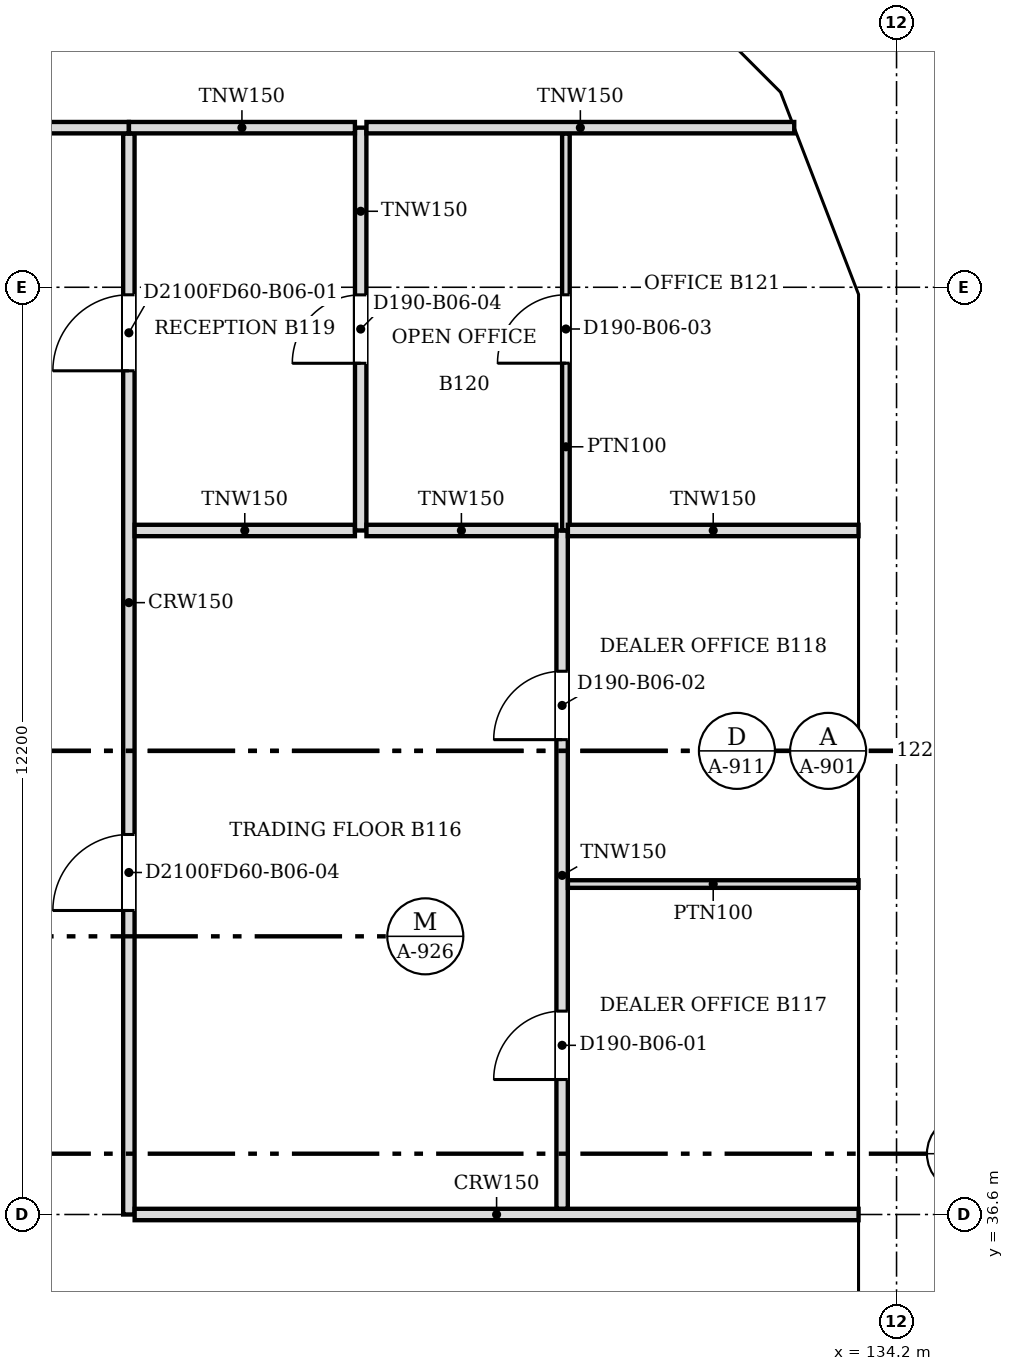
"""IFC4 building model, lengths in metres.
Left out: names, types, materials, properties, quantities, classifications, styles, units other than length and angle.
Written with IfcOpenShell. Run it as: python <this file> out.ifc"""

import sys

from ifc_helpers import new_model, si_unit, direction, frame, frame_2d, origin, place, context, subcontext, project, spatial, polyline, rectangle, outline, extrude, faceted_brep, source, transform, mapped, element, fill, save


model = new_model("IFC4")
c1 = context("Model", 3, precision=1e-05, world=origin(), true_north=direction((0.0, 1.0)))
c2 = subcontext(c1, "Body", "Model", "MODEL_VIEW")
j1 = project(units=[si_unit("LENGTHUNIT", "METRE"), si_unit("PLANEANGLEUNIT", "RADIAN")], contexts=[c1])
p1 = place(None, origin())
s1 = spatial("IfcSite", under=j1, at=p1, CompositionType="ELEMENT")
p2 = place(p1, origin())
s2 = spatial("IfcBuilding", under=s1, at=p2, CompositionType="ELEMENT")
p3 = place(p2, frame((0.0, 0.0, 60.0)))
s3 = spatial("IfcBuildingStorey", under=s2, at=p3, CompositionType="ELEMENT", Elevation=60.0)
m1 = source(origin(), c2, "Body", "Brep", [
    faceted_brep([(3.05, -0.25, 0.0), (6.1, -0.25, 3.8), (6.1, -0.25, 3.8), (3.05, -0.25, 7.6), (0.0, -0.25, 3.8), (0.0, 0.25, 3.8), (3.05, 0.25, 7.6), (6.1, 0.25, 3.8), (6.1, 0.25, 3.8), (3.05, 0.25, 0.0)], [[[0, 1, 2, 3, 4]], [[5, 6, 7, 8, 9]], [[9, 8, 1, 0]], [[7, 6, 3, 2]], [[6, 5, 4, 3]], [[5, 9, 0, 4]], [[1, 8, 7, 2]]]),
])
p4 = place(p3, frame((133.95, 33.55, -3.8), z_axis=(0.0, 0.0, 1.0), x_axis=(0.0, 1.0, 0.0)))
e1 = element("IfcWall", 1, at=p4, inside=s3, PredefinedType="SOLIDWALL", context=c2, shape_type="MappedRepresentation", body=[
    mapped(m1, transform((0.0, 0.0, 0.0), scale=1.0)),
])
m2 = source(origin(), c2, "Body", "SweptSolid", [
    extrude(outline(polyline([(3.05, 0.399), (5.78, 3.8), (3.05, 7.201), (0.321, 3.8), (3.05, 0.399)])), frame((0.0, 0.26, 0.0), z_axis=(0.0, -1.0, 0.0), x_axis=(1.0, 0.0, 0.0)), (0.0, 0.0, 1.0), 0.52),
])
p5 = place(p4, origin())
e2 = element("IfcOpeningElement", 2, at=p5, cuts=e1, PredefinedType="OPENING", context=c2, shape_type="MappedRepresentation", body=[
    mapped(m2, transform((0.0, 0.0, 0.0), scale=1.0)),
])
m3 = source(origin(), c2, "Body", "SweptSolid", [
    extrude(outline(polyline([(3.05, 0.0), (6.1, 3.8), (3.05, 7.6), (0.0, 3.8), (3.05, 0.0)])), frame((0.0, 0.25, 0.0), z_axis=(0.0, -1.0, 0.0), x_axis=(1.0, 0.0, 0.0)), (0.0, 0.0, 1.0), 0.5),
])
p6 = place(p3, frame((133.95, 39.65, -3.8), z_axis=(0.0, 0.0, 1.0), x_axis=(0.0, 1.0, 0.0)))
e3 = element("IfcWall", 3, at=p6, inside=s3, PredefinedType="SOLIDWALL", context=c2, shape_type="MappedRepresentation", body=[
    mapped(m3, transform((0.0, 0.0, 0.0), scale=1.0)),
])
p7 = place(p6, origin())
e4 = element("IfcOpeningElement", 4, at=p7, cuts=e3, PredefinedType="OPENING", context=c2, shape_type="MappedRepresentation", body=[
    mapped(m2, transform((0.0, 0.0, 0.0), scale=1.0)),
])
m4 = source(origin(), c2, "Body", "Brep", [
    faceted_brep([(3.003, -0.25, 0.0), (3.05, -0.25, 0.06), (3.05, -0.25, 7.54), (3.003, -0.25, 7.6), (0.0, -0.25, 3.8), (0.0, 0.25, 3.8), (2.957, 0.25, 7.541), (2.957, 0.25, 0.059), (3.003, 0.0, 0.0), (3.003, 0.0, 7.6)], [[[0, 1, 2, 3, 4]], [[5, 6, 7]], [[1, 0, 8]], [[9, 3, 2]], [[6, 5, 4, 3, 9]], [[5, 7, 8, 0, 4]], [[1, 8, 7, 6, 9, 2]]]),
])
p8 = place(p3, frame((133.95, 45.75, -3.8), z_axis=(0.0, 0.0, 1.0), x_axis=(0.0, 1.0, 0.0)))
e5 = element("IfcWall", 5, at=p8, inside=s3, PredefinedType="SOLIDWALL", context=c2, shape_type="MappedRepresentation", body=[
    mapped(m4, transform((0.0, 0.0, 0.0), scale=1.0)),
])
m5 = source(origin(), c2, "Body", "SweptSolid", [
    extrude(outline(polyline([(2.803, 6.944), (0.319, 3.8), (2.803, 0.656), (2.803, 6.944)])), frame((0.0, 0.26, 0.0), z_axis=(0.0, -1.0, 0.0), x_axis=(1.0, 0.0, 0.0)), (0.0, 0.0, 1.0), 0.52),
])
p9 = place(p8, origin())
e6 = element("IfcOpeningElement", 6, at=p9, cuts=e5, PredefinedType="OPENING", context=c2, shape_type="MappedRepresentation", body=[
    mapped(m5, transform((0.0, 0.0, 0.0), scale=1.0)),
])
m6 = source(origin(), c2, "Body", "Brep", [
    faceted_brep([(0.047, -0.25, 0.0), (2.997, -0.25, 3.8), (0.047, -0.25, 7.6), (0.0, -0.25, 7.541), (0.0, -0.25, 0.059), (0.093, 0.25, 7.54), (2.944, 0.25, 3.868), (2.944, 0.25, 3.732), (0.093, 0.25, 0.06), (2.997, 0.0, 3.8), (0.047, 0.0, 0.0), (0.047, 0.0, 7.6)], [[[0, 1, 2, 3, 4]], [[5, 6, 7, 8]], [[8, 7, 9, 1, 0, 10]], [[6, 5, 11, 2, 1, 9]], [[3, 2, 11]], [[10, 0, 4]], [[8, 10, 4, 3, 11, 5]], [[9, 7, 6]]]),
])
p10 = place(p3, frame((133.967, 48.71, -3.8), z_axis=(0.0, 0.0, 1.0), x_axis=(-0.359901446078, 0.932990326376, 0.0)))
e7 = element("IfcWall", 7, at=p10, inside=s3, PredefinedType="SOLIDWALL", context=c2, shape_type="MappedRepresentation", body=[
    mapped(m6, transform((0.0, 0.0, 0.0), scale=1.0)),
])
m7 = source(origin(), c2, "Body", "SweptSolid", [
    extrude(outline(polyline([(0.247, 0.665), (2.681, 3.8), (0.247, 6.935), (0.247, 0.665)])), frame((0.0, 0.26, 0.0), z_axis=(0.0, -1.0, 0.0), x_axis=(1.0, 0.0, 0.0)), (0.0, 0.0, 1.0), 0.52),
])
p11 = place(p10, origin())
e8 = element("IfcOpeningElement", 8, at=p11, cuts=e7, PredefinedType="OPENING", context=c2, shape_type="MappedRepresentation", body=[
    mapped(m7, transform((0.0, 0.0, 0.0), scale=1.0)),
])
m8 = source(origin(), c2, "Body", "Brep", [
    faceted_brep([(2.944, -0.25, 0.0), (2.997, -0.25, 0.068), (2.997, -0.25, 7.532), (2.944, -0.25, 7.6), (0.0, -0.25, 3.8), (0.053, 0.25, 3.868), (2.891, 0.25, 7.532), (2.891, 0.25, 0.068), (0.053, 0.25, 3.732), (2.944, 0.0, 0.0), (2.944, 0.0, 7.6), (0.0, 0.0, 3.8)], [[[0, 1, 2, 3, 4]], [[5, 6, 7, 8]], [[1, 0, 9]], [[10, 3, 2]], [[6, 5, 11, 4, 3, 10]], [[8, 7, 9, 0, 4, 11]], [[8, 11, 5]], [[1, 9, 7, 6, 10, 2]]]),
])
p12 = place(p3, frame((132.888, 51.506, -3.8), z_axis=(0.0, 0.0, 1.0), x_axis=(-0.707147509625, 0.707066050402, 0.0)))
e9 = element("IfcWall", 9, at=p12, inside=s3, PredefinedType="SOLIDWALL", context=c2, shape_type="MappedRepresentation", body=[
    mapped(m8, transform((0.0, 0.0, 0.0), scale=1.0)),
])
m9 = source(origin(), c2, "Body", "SweptSolid", [
    extrude(outline(polyline([(2.744, 6.934), (0.316, 3.8), (2.744, 0.666), (2.744, 6.934)])), frame((0.0, 0.26, 0.0), z_axis=(0.0, -1.0, 0.0), x_axis=(1.0, 0.0, 0.0)), (0.0, 0.0, 1.0), 0.52),
])
p13 = place(p12, origin())
e10 = element("IfcOpeningElement", 10, at=p13, cuts=e9, PredefinedType="OPENING", context=c2, shape_type="MappedRepresentation", body=[
    mapped(m9, transform((0.0, 0.0, 0.0), scale=1.0)),
])
m10 = source(origin(), c2, "Body", "SweptSolid", [
    extrude(outline(polyline([(3.05, 0.0), (6.1, 3.8), (0.0, 3.8), (3.05, 0.0)])), frame((0.0, 0.25, 0.0), z_axis=(0.0, -1.0, 0.0), x_axis=(1.0, 0.0, 0.0)), (0.0, 0.0, 1.0), 0.5),
])
p14 = place(p3, frame((133.95, 30.5, 0.0), z_axis=(0.0, 0.0, 1.0), x_axis=(0.0, 1.0, 0.0)))
e11 = element("IfcWall", 11, at=p14, inside=s3, PredefinedType="SOLIDWALL", context=c2, shape_type="MappedRepresentation", body=[
    mapped(m10, transform((0.0, 0.0, 0.0), scale=1.0)),
])
m11 = source(origin(), c2, "Body", "SweptSolid", [
    extrude(outline(polyline([(3.05, 0.399), (5.579, 3.55), (0.521, 3.55), (3.05, 0.399)])), frame((0.0, 0.26, 0.0), z_axis=(0.0, -1.0, 0.0), x_axis=(1.0, 0.0, 0.0)), (0.0, 0.0, 1.0), 0.52),
])
p15 = place(p14, origin())
e12 = element("IfcOpeningElement", 12, at=p15, cuts=e11, PredefinedType="OPENING", context=c2, shape_type="MappedRepresentation", body=[
    mapped(m11, transform((0.0, 0.0, 0.0), scale=1.0)),
])
m12 = source(origin(), c2, "Body", "Brep", [
    faceted_brep([(3.05, -0.25, 0.0), (6.1, -0.25, 3.8), (6.1, -0.25, 3.8), (0.0, -0.25, 3.8), (0.0, 0.25, 3.8), (6.1, 0.25, 3.8), (6.1, 0.25, 3.8), (3.05, 0.25, 0.0)], [[[0, 1, 2, 3]], [[4, 5, 6, 7]], [[7, 6, 1, 0]], [[5, 4, 3, 2]], [[4, 7, 0, 3]], [[1, 6, 5, 2]]]),
])
p16 = place(p3, frame((133.95, 36.6, 0.0), z_axis=(0.0, 0.0, 1.0), x_axis=(0.0, 1.0, 0.0)))
e13 = element("IfcWall", 13, at=p16, inside=s3, PredefinedType="SOLIDWALL", context=c2, shape_type="MappedRepresentation", body=[
    mapped(m12, transform((0.0, 0.0, 0.0), scale=1.0)),
])
p17 = place(p16, origin())
e14 = element("IfcOpeningElement", 14, at=p17, cuts=e13, PredefinedType="OPENING", context=c2, shape_type="MappedRepresentation", body=[
    mapped(m11, transform((0.0, 0.0, 0.0), scale=1.0)),
])
m13 = source(origin(), c2, "Body", "Brep", [
    faceted_brep([(3.05, -0.25, 0.0), (6.053, -0.25, 3.8), (0.0, -0.25, 3.8), (0.0, 0.25, 3.8), (6.007, 0.25, 3.8), (6.007, 0.25, 3.741), (3.05, 0.25, 0.0), (6.053, 0.0, 3.8)], [[[0, 1, 2]], [[3, 4, 5, 6]], [[6, 5, 7, 1, 0]], [[4, 3, 2, 1, 7]], [[3, 6, 0, 2]], [[5, 4, 7]]]),
])
p18 = place(p3, frame((133.95, 42.7, 0.0), z_axis=(0.0, 0.0, 1.0), x_axis=(0.0, 1.0, 0.0)))
e15 = element("IfcWall", 15, at=p18, inside=s3, PredefinedType="SOLIDWALL", context=c2, shape_type="MappedRepresentation", body=[
    mapped(m13, transform((0.0, 0.0, 0.0), scale=1.0)),
])
m14 = source(origin(), c2, "Body", "SweptSolid", [
    extrude(outline(polyline([(3.049, 0.401), (5.537, 3.55), (0.521, 3.55), (3.049, 0.401)])), frame((0.0, 0.26, 0.0), z_axis=(0.0, -1.0, 0.0), x_axis=(1.0, 0.0, 0.0)), (0.0, 0.0, 1.0), 0.52),
])
p19 = place(p18, origin())
e16 = element("IfcOpeningElement", 16, at=p19, cuts=e15, PredefinedType="OPENING", context=c2, shape_type="MappedRepresentation", body=[
    mapped(m14, transform((0.0, 0.0, 0.0), scale=1.0)),
])
m15 = source(origin(), c2, "Body", "Brep", [
    faceted_brep([(2.95, -0.25, 0.0), (3.003, -0.25, 0.068), (3.003, -0.25, 3.8), (0.0, -0.25, 3.8), (0.047, 0.25, 3.8), (2.898, 0.25, 3.8), (2.898, 0.25, 0.068), (0.047, 0.25, 3.74), (2.95, 0.0, 0.0), (0.0, 0.0, 3.8)], [[[0, 1, 2, 3]], [[4, 5, 6, 7]], [[1, 0, 8]], [[5, 4, 9, 3, 2]], [[7, 6, 8, 0, 3, 9]], [[7, 9, 4]], [[1, 8, 6, 5, 2]]]),
])
p20 = place(p3, frame((133.95, 48.753, 0.0), z_axis=(0.0, 0.0, 1.0), x_axis=(-0.359855894603, 0.933007896601, 0.0)))
e17 = element("IfcWall", 17, at=p20, inside=s3, PredefinedType="SOLIDWALL", context=c2, shape_type="MappedRepresentation", body=[
    mapped(m15, transform((0.0, 0.0, 0.0), scale=1.0)),
])
m16 = source(origin(), c2, "Body", "SweptSolid", [
    extrude(outline(polyline([(2.75, 3.55), (0.511, 3.55), (2.75, 0.665), (2.75, 3.55)])), frame((0.0, 0.26, 0.0), z_axis=(0.0, -1.0, 0.0), x_axis=(1.0, 0.0, 0.0)), (0.0, 0.0, 1.0), 0.52),
])
p21 = place(p20, origin())
e18 = element("IfcOpeningElement", 18, at=p21, cuts=e17, PredefinedType="OPENING", context=c2, shape_type="MappedRepresentation", body=[
    mapped(m16, transform((0.0, 0.0, 0.0), scale=1.0)),
])
m17 = source(origin(), c2, "Body", "Brep", [
    faceted_brep([(0.053, -0.25, 0.0), (2.997, -0.25, 3.8), (0.0, -0.25, 3.8), (0.0, -0.25, 0.068), (0.106, 0.25, 3.8), (2.944, 0.25, 3.8), (2.944, 0.25, 3.732), (0.106, 0.25, 0.068), (2.997, 0.0, 3.8), (0.053, 0.0, 0.0)], [[[0, 1, 2, 3]], [[4, 5, 6, 7]], [[7, 6, 8, 1, 0, 9]], [[5, 4, 2, 1, 8]], [[9, 0, 3]], [[7, 9, 3, 2, 4]], [[6, 5, 8]]]),
])
p22 = place(p3, frame((132.926, 51.469, 0.0), z_axis=(0.0, 0.0, 1.0), x_axis=(-0.707066050402, 0.707147509625, 0.0)))
e19 = element("IfcWall", 19, at=p22, inside=s3, PredefinedType="SOLIDWALL", context=c2, shape_type="MappedRepresentation", body=[
    mapped(m17, transform((0.0, 0.0, 0.0), scale=1.0)),
])
m18 = source(origin(), c2, "Body", "SweptSolid", [
    extrude(outline(polyline([(0.253, 0.666), (2.487, 3.55), (0.253, 3.55), (0.253, 0.666)])), frame((0.0, 0.26, 0.0), z_axis=(0.0, -1.0, 0.0), x_axis=(1.0, 0.0, 0.0)), (0.0, 0.0, 1.0), 0.52),
])
p23 = place(p22, origin())
e20 = element("IfcOpeningElement", 20, at=p23, cuts=e19, PredefinedType="OPENING", context=c2, shape_type="MappedRepresentation", body=[
    mapped(m18, transform((0.0, 0.0, 0.0), scale=1.0)),
])
p24 = place(p3, frame((124.1, 50.824, 0.0), z_axis=(0.0, 0.0, 1.0), x_axis=(0.0, -1.0, 0.0)))
e21 = element("IfcWall", 21, at=p24, inside=s3, PredefinedType="PARTITIONING", context=c2, shape_type="SweptSolid", body=[
    extrude(rectangle(XDim=14.224, YDim=0.15, at=frame_2d((7.112, 0.0))), origin(), (0.0, 0.0, 1.0), 2.888),
])
m19 = source(origin(), c2, "Body", "SweptSolid", [
    extrude(rectangle(XDim=1.0, YDim=2.1, at=frame_2d((0.5, 1.05))), frame((0.0, 0.085, 0.0), z_axis=(0.0, -1.0, 0.0), x_axis=(1.0, 0.0, 0.0)), (0.0, 0.0, 1.0), 0.17),
])
p25 = place(p24, frame((2.123, 0.0, 0.0)))
e22 = element("IfcOpeningElement", 22, at=p25, cuts=e21, PredefinedType="OPENING", context=c2, shape_type="MappedRepresentation", body=[
    mapped(m19, transform((0.0, 0.0, 0.0), scale=1.0)),
])
p26 = place(p24, frame((9.224, 0.0, 0.0)))
e23 = element("IfcOpeningElement", 23, at=p26, cuts=e21, PredefinedType="OPENING", context=c2, shape_type="MappedRepresentation", body=[
    mapped(m19, transform((0.0, 0.0, 0.0), scale=1.0)),
])
p27 = place(p3, frame((124.176, 36.6, 0.0), z_axis=(0.0, 0.0, 1.0), x_axis=(1.0, 0.0, 0.0)))
e24 = element("IfcWall", 24, at=p27, inside=s3, PredefinedType="PARTITIONING", context=c2, shape_type="SweptSolid", body=[
    extrude(rectangle(XDim=9.524, YDim=0.15, at=frame_2d((4.762, 0.0))), origin(), (0.0, 0.0, 1.0), 2.888),
])
p28 = place(p3, frame((129.8, 45.6, 0.0), z_axis=(0.0, 0.0, 1.0), x_axis=(0.0, -1.0, 0.0)))
e25 = element("IfcWall", 25, at=p28, inside=s3, PredefinedType="PARTITIONING", context=c2, shape_type="SweptSolid", body=[
    extrude(rectangle(XDim=8.924, YDim=0.15, at=frame_2d((4.462, 0.0))), origin(), (0.0, 0.0, 1.0), 2.888),
])
m20 = source(origin(), c2, "Body", "SweptSolid", [
    extrude(rectangle(XDim=0.9, YDim=2.1, at=frame_2d((0.45, 1.05))), frame((0.0, 0.085, 0.0), z_axis=(0.0, -1.0, 0.0), x_axis=(1.0, 0.0, 0.0)), (0.0, 0.0, 1.0), 0.17),
])
p29 = place(p28, frame((6.324, 0.0, 0.0)))
e26 = element("IfcOpeningElement", 26, at=p29, cuts=e25, PredefinedType="OPENING", context=c2, shape_type="MappedRepresentation", body=[
    mapped(m20, transform((0.0, 0.0, 0.0), scale=1.0)),
])
p30 = place(p28, frame((1.852, 0.0, 0.0)))
e27 = element("IfcOpeningElement", 27, at=p30, cuts=e25, PredefinedType="OPENING", context=c2, shape_type="MappedRepresentation", body=[
    mapped(m20, transform((0.0, 0.0, 0.0), scale=1.0)),
])
p31 = place(p3, frame((129.876, 40.948, 0.0), z_axis=(0.0, 0.0, 1.0), x_axis=(1.0, 0.0, 0.0)))
e28 = element("IfcWall", 28, at=p31, inside=s3, PredefinedType="PARTITIONING", context=c2, shape_type="SweptSolid", body=[
    extrude(rectangle(XDim=3.824, YDim=0.1, at=frame_2d((1.912, 0.0))), origin(), (0.0, 0.0, 1.0), 2.888),
])
p32 = place(p3, frame((124.176, 45.6, 0.0), z_axis=(0.0, 0.0, 1.0), x_axis=(1.0, 0.0, 0.0)))
e29 = element("IfcWall", 29, at=p32, inside=s3, PredefinedType="PARTITIONING", context=c2, shape_type="SweptSolid", body=[
    extrude(rectangle(XDim=2.898, YDim=0.15, at=frame_2d((1.449, 0.0))), origin(), (0.0, 0.0, 1.0), 2.888),
])
p33 = place(p3, frame((127.15, 50.9, 0.0), z_axis=(0.0, 0.0, 1.0), x_axis=(0.0, -1.0, 0.0)))
e30 = element("IfcWall", 30, at=p33, inside=s3, PredefinedType="PARTITIONING", context=c2, shape_type="SweptSolid", body=[
    extrude(rectangle(XDim=5.3, YDim=0.15, at=frame_2d((2.65, 0.0))), origin(), (0.0, 0.0, 1.0), 2.888),
])
p34 = place(p33, frame((2.2, 0.0, 0.0)))
e31 = element("IfcOpeningElement", 31, at=p34, cuts=e30, PredefinedType="OPENING", context=c2, shape_type="MappedRepresentation", body=[
    mapped(m20, transform((0.0, 0.0, 0.0), scale=1.0)),
])
p35 = place(p3, frame((127.226, 45.6, 0.0), z_axis=(0.0, 0.0, 1.0), x_axis=(1.0, 0.0, 0.0)))
e32 = element("IfcWall", 32, at=p35, inside=s3, PredefinedType="PARTITIONING", context=c2, shape_type="SweptSolid", body=[
    extrude(rectangle(XDim=2.498, YDim=0.15, at=frame_2d((1.249, 0.0))), origin(), (0.0, 0.0, 1.0), 2.888),
])
p36 = place(p3, frame((129.85, 50.824, 0.0), z_axis=(0.0, 0.0, 1.0), x_axis=(0.0, -1.0, 0.0)))
e33 = element("IfcWall", 33, at=p36, inside=s3, PredefinedType="PARTITIONING", context=c2, shape_type="SweptSolid", body=[
    extrude(rectangle(XDim=5.223, YDim=0.1, at=frame_2d((2.611, 0.0))), origin(), (0.0, 0.0, 1.0), 2.888),
])
m21 = source(origin(), c2, "Body", "SweptSolid", [
    extrude(rectangle(XDim=0.9, YDim=2.1, at=frame_2d((0.45, 1.05))), frame((0.0, 0.06, 0.0), z_axis=(0.0, -1.0, 0.0), x_axis=(1.0, 0.0, 0.0)), (0.0, 0.0, 1.0), 0.12),
])
p37 = place(p36, frame((2.123, 0.0, 0.0)))
e34 = element("IfcOpeningElement", 34, at=p37, cuts=e33, PredefinedType="OPENING", context=c2, shape_type="MappedRepresentation", body=[
    mapped(m21, transform((0.0, 0.0, 0.0), scale=1.0)),
])
p38 = place(p3, frame((129.876, 45.6, 0.0), z_axis=(0.0, 0.0, 1.0), x_axis=(1.0, 0.0, 0.0)))
e35 = element("IfcWall", 35, at=p38, inside=s3, PredefinedType="PARTITIONING", context=c2, shape_type="SweptSolid", body=[
    extrude(rectangle(XDim=3.824, YDim=0.15, at=frame_2d((1.912, 0.0))), origin(), (0.0, 0.0, 1.0), 2.888),
])
p39 = place(p3, frame((108.5, 50.9, 0.0), z_axis=(0.0, 0.0, 1.0), x_axis=(1.0, 0.0, 0.0)))
e36 = element("IfcWall", 36, at=p39, inside=s3, PredefinedType="PARTITIONING", context=c2, shape_type="SweptSolid", body=[
    extrude(rectangle(XDim=15.6, YDim=0.15, at=frame_2d((7.8, 0.0))), origin(), (0.0, 0.0, 1.0), 2.888),
])
p40 = place(p39, frame((0.5, 0.0, 0.0)))
e37 = element("IfcOpeningElement", 37, at=p40, cuts=e36, PredefinedType="OPENING", context=c2, shape_type="MappedRepresentation", body=[
    mapped(m19, transform((0.0, 0.0, 0.0), scale=1.0)),
])
p41 = place(p39, frame((8.3, 0.0, 0.0)))
e38 = element("IfcOpeningElement", 38, at=p41, cuts=e36, PredefinedType="OPENING", context=c2, shape_type="MappedRepresentation", body=[
    mapped(m20, transform((0.0, 0.0, 0.0), scale=1.0)),
])
p42 = place(p3, frame((124.101, 50.9, 0.0), z_axis=(0.0, 0.0, 1.0), x_axis=(1.0, 0.0, 0.0)))
e39 = element("IfcWall", 39, at=p42, inside=s3, PredefinedType="PARTITIONING", context=c2, shape_type="SweptSolid", body=[
    extrude(rectangle(XDim=2.973, YDim=0.15, at=frame_2d((1.486, 0.0))), origin(), (0.0, 0.0, 1.0), 2.888),
])
p43 = place(p3, frame((127.226, 50.9, 0.0), z_axis=(0.0, 0.0, 1.0), x_axis=(1.0, 0.0, 0.0)))
e40 = element("IfcWall", 40, at=p43, inside=s3, PredefinedType="PARTITIONING", context=c2, shape_type="SweptSolid", body=[
    extrude(rectangle(XDim=5.628, YDim=0.15, at=frame_2d((2.814, 0.0))), origin(), (0.0, 0.0, 1.0), 2.888),
])
m22 = source(origin(), c2, "Body", "SweptSolid", [
    extrude(rectangle(XDim=0.9, YDim=2.1, at=frame_2d((0.45, 1.05))), frame((0.0, 0.025, 0.0), z_axis=(0.0, -1.0, 0.0), x_axis=(1.0, 0.0, 0.0)), (0.0, 0.0, 1.0), 0.05),
])
p44 = place(p29, origin())
e41 = element("IfcDoor", 41, at=p44, inside=s3, OperationType="SINGLE_SWING_RIGHT", PredefinedType="DOOR", context=c2, shape_type="MappedRepresentation", body=[
    mapped(m22, transform((0.0, 0.0, 0.0), scale=1.0)),
])
fill(e26, e41)
p45 = place(p30, origin())
e42 = element("IfcDoor", 42, at=p45, inside=s3, OperationType="SINGLE_SWING_RIGHT", PredefinedType="DOOR", context=c2, shape_type="MappedRepresentation", body=[
    mapped(m22, transform((0.0, 0.0, 0.0), scale=1.0)),
])
fill(e27, e42)
m23 = source(origin(), c2, "Body", "SweptSolid", [
    extrude(rectangle(XDim=1.0, YDim=2.1, at=frame_2d((0.5, 1.05))), frame((0.0, 0.025, 0.0), z_axis=(0.0, -1.0, 0.0), x_axis=(1.0, 0.0, 0.0)), (0.0, 0.0, 1.0), 0.05),
])
p46 = place(p25, origin())
e43 = element("IfcDoor", 43, at=p46, inside=s3, OperationType="SINGLE_SWING_RIGHT", PredefinedType="DOOR", context=c2, shape_type="MappedRepresentation", body=[
    mapped(m23, transform((0.0, 0.0, 0.0), scale=1.0)),
])
fill(e22, e43)
p47 = place(p37, origin())
e44 = element("IfcDoor", 44, at=p47, inside=s3, OperationType="SINGLE_SWING_RIGHT", PredefinedType="DOOR", context=c2, shape_type="MappedRepresentation", body=[
    mapped(m22, transform((0.0, 0.0, 0.0), scale=1.0)),
])
fill(e34, e44)
p48 = place(p34, origin())
e45 = element("IfcDoor", 45, at=p48, inside=s3, OperationType="SINGLE_SWING_RIGHT", PredefinedType="DOOR", context=c2, shape_type="MappedRepresentation", body=[
    mapped(m22, transform((0.0, 0.0, 0.0), scale=1.0)),
])
fill(e31, e45)
p49 = place(p26, origin())
e46 = element("IfcDoor", 46, at=p49, inside=s3, OperationType="SINGLE_SWING_RIGHT", PredefinedType="DOOR", context=c2, shape_type="MappedRepresentation", body=[
    mapped(m23, transform((0.0, 0.0, 0.0), scale=1.0)),
])
fill(e23, e46)
save(model, sys.argv[1])
